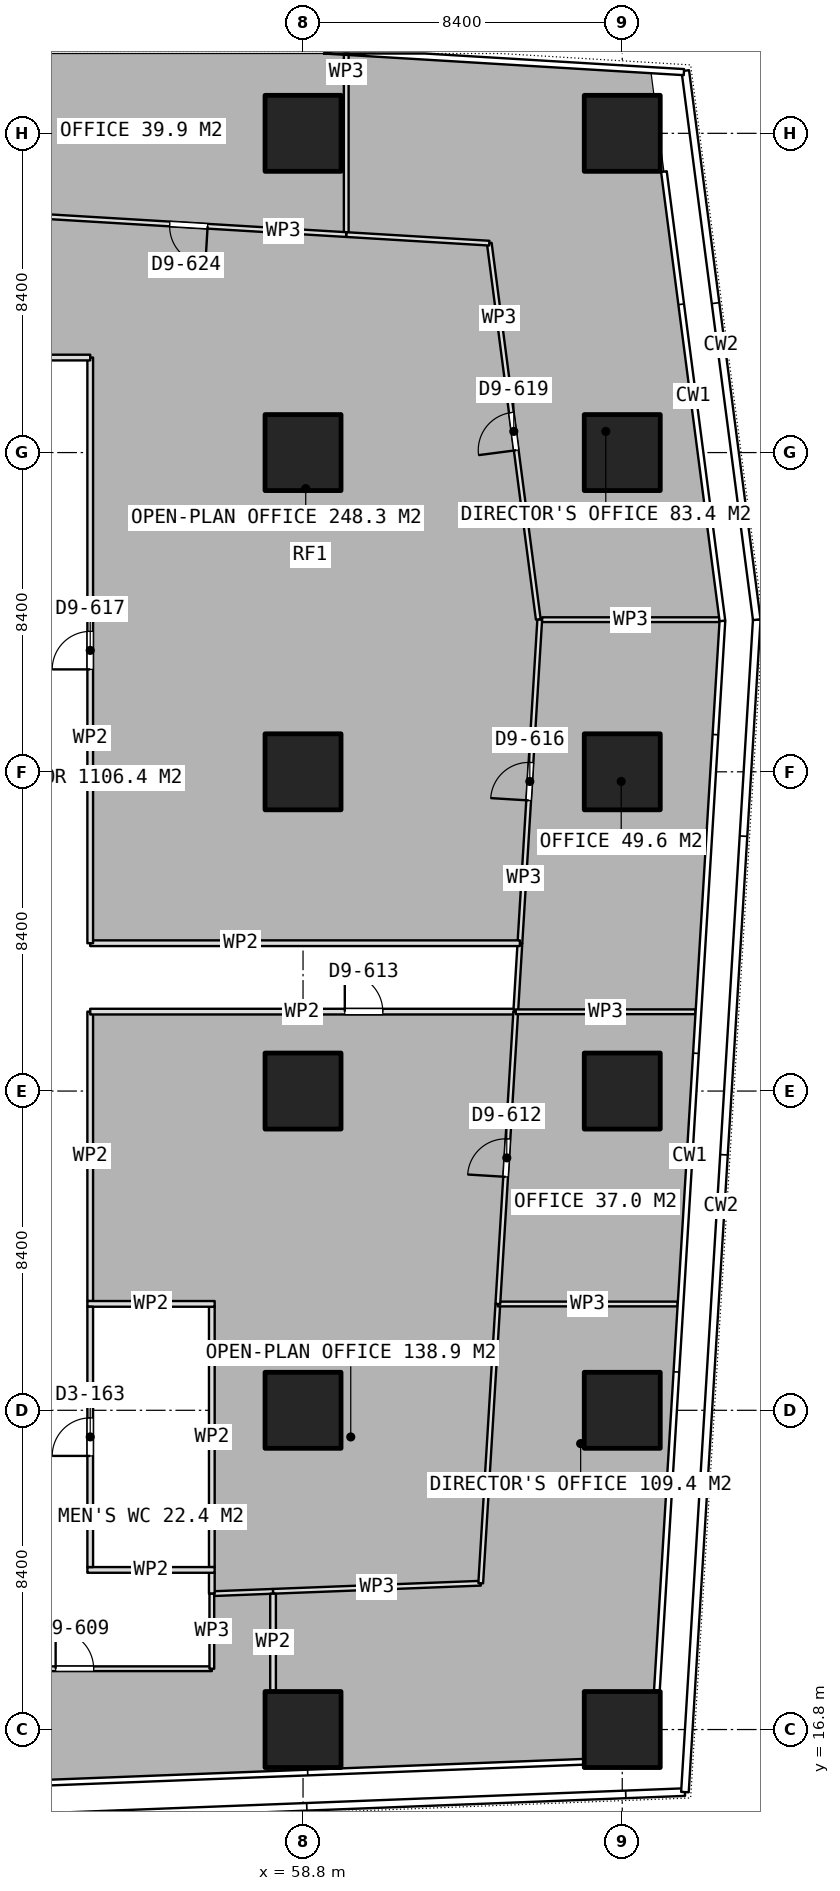
"""IFC4 building model, lengths in metres.
Left out: names, types, materials, properties, quantities, classifications, styles, units other than length and angle.
Written with IfcOpenShell. Run it as: python <this file> out.ifc"""

import sys

from ifc_helpers import new_model, si_unit, direction, frame, frame_2d, origin, origin_2d, place, context, subcontext, project, spatial, rectangle, extrude, element, fill, save


model = new_model("IFC4")
c1 = context("Model", 3, precision=1e-05, world=origin(), true_north=direction((0.0, 1.0)))
c2 = subcontext(c1, "Body", "Model", "MODEL_VIEW")
j1 = project(units=[si_unit("LENGTHUNIT", "METRE"), si_unit("PLANEANGLEUNIT", "RADIAN")], contexts=[c1])
p1 = place(None, origin())
s1 = spatial("IfcSite", under=j1, at=p1, CompositionType="ELEMENT")
p2 = place(p1, origin())
s2 = spatial("IfcBuilding", under=s1, at=p2, CompositionType="ELEMENT")
p3 = place(p2, frame((0.0, 0.0, 151.55)))
s3 = spatial("IfcBuildingStorey", under=s2, at=p3, CompositionType="ELEMENT", Elevation=151.55)
for number, where, z_axis, x_axis in (
    (1, (58.8, 16.8, 0.0), (0.0, 0.0, 1.0), (1.0, 0.0, 0.0)),
    (2, (58.8, 25.2, 0.0), (0.0, 0.0, 1.0), (1.0, 0.0, 0.0)),
    (3, (58.8, 33.6, 0.0), (0.0, 0.0, 1.0), (1.0, 0.0, 0.0)),
    (4, (58.8, 42.0, 0.0), (0.0, 0.0, 1.0), (1.0, 0.0, 0.0)),
    (5, (58.8, 50.4, 0.0), (0.0, 0.0, 1.0), (1.0, 0.0, 0.0)),
    (6, (58.8, 58.8, 0.0), (0.0, 0.0, 1.0), (1.0, 0.0, 0.0)),
    (7, (67.2, 16.8, 0.0), (0.0, 0.0, 1.0), (1.0, 0.0, 0.0)),
    (8, (67.2, 25.2, 0.0), (0.0, 0.0, 1.0), (1.0, 0.0, 0.0)),
    (9, (67.2, 33.6, 0.0), (0.0, 0.0, 1.0), (1.0, 0.0, 0.0)),
    (10, (67.2, 42.0, 0.0), (0.0, 0.0, 1.0), (1.0, 0.0, 0.0)),
    (11, (67.2, 50.4, 0.0), (0.0, 0.0, 1.0), (1.0, 0.0, 0.0)),
    (12, (67.2, 58.8, 0.0), (0.0, 0.0, 1.0), (1.0, 0.0, 0.0)),
):
    element("IfcColumn", number, at=place(p3, frame(where, z_axis=z_axis, x_axis=x_axis)), inside=s3, PredefinedType="COLUMN", context=c2, shape_type="SweptSolid", body=[
        extrude(rectangle(XDim=2.0, YDim=2.0, at=origin_2d()), origin(), (0.0, 0.0, 1.0), 3.75),
    ])
for number, where, z_axis, x_axis in (
    (13, (53.125, 21.0, 0.0), (0.0, 0.0, 1.0), (1.0, 0.0, 0.0)),
    (14, (53.125, 28.0, 0.0), (0.0, 0.0, 1.0), (1.0, 0.0, 0.0)),
):
    element("IfcWall", number, at=place(p3, frame(where, z_axis=z_axis, x_axis=x_axis)), inside=s3, PredefinedType="PARTITIONING", context=c2, shape_type="SweptSolid", body=[
        extrude(rectangle(XDim=3.35, YDim=0.15, at=frame_2d((1.675, 0.0))), origin(), (0.0, 0.0, 1.0), 3.5),
    ])
p4 = place(p3, frame((53.2, 21.075, 0.0), z_axis=(0.0, 0.0, 1.0), x_axis=(0.0, 1.0, 0.0)))
e15 = element("IfcWall", 15, at=p4, inside=s3, PredefinedType="PARTITIONING", context=c2, shape_type="SweptSolid", body=[
    extrude(rectangle(XDim=6.85, YDim=0.15, at=frame_2d((3.425, 0.0))), origin(), (0.0, 0.0, 1.0), 3.5),
])
p5 = place(p4, frame((2.925, 0.0, 0.0)))
e16 = element("IfcOpeningElement", 16, at=p5, cuts=e15, PredefinedType="OPENING", context=c2, shape_type="SweptSolid", body=[
    extrude(rectangle(XDim=1.0, YDim=2.1, at=frame_2d((0.5, 1.05))), frame((0.0, 0.085, 0.0), z_axis=(0.0, -1.0, 0.0), x_axis=(1.0, 0.0, 0.0)), (0.0, 0.0, 1.0), 0.17),
])
p6 = place(p3, frame((56.4, 21.075, 0.0), z_axis=(0.0, 0.0, 1.0), x_axis=(0.0, 1.0, 0.0)))
e17 = element("IfcWall", 17, at=p6, inside=s3, PredefinedType="PARTITIONING", context=c2, shape_type="SweptSolid", body=[
    extrude(rectangle(XDim=6.85, YDim=0.15, at=frame_2d((3.425, 0.0))), origin(), (0.0, 0.0, 1.0), 3.5),
])
p7 = place(p3, frame((56.4, 20.374, 0.0), z_axis=(0.0, 0.0, 1.0), x_axis=(0.999237517487, 0.039043355976, 0.0)))
e18 = element("IfcWall", 18, at=p7, inside=s3, PredefinedType="PARTITIONING", context=c2, shape_type="SweptSolid", body=[
    extrude(rectangle(XDim=1.613, YDim=0.125, at=frame_2d((0.807, 0.0))), origin(), (0.0, 0.0, 1.0), 3.5),
])
p8 = place(p3, frame((58.012, 20.437, 0.0), z_axis=(0.0, 0.0, 1.0), x_axis=(0.999241859152, 0.038932080836, 0.0)))
e19 = element("IfcWall", 19, at=p8, inside=s3, PredefinedType="PARTITIONING", context=c2, shape_type="SweptSolid", body=[
    extrude(rectangle(XDim=5.468, YDim=0.125, at=frame_2d((2.734, 0.0))), origin(), (0.0, 0.0, 1.0), 3.5),
])
p9 = place(p3, frame((63.476, 20.65, 0.0), z_axis=(0.0, 0.0, 1.0), x_axis=(0.061126922055, 0.998130001252, 0.0)))
e20 = element("IfcWall", 20, at=p9, inside=s3, PredefinedType="PARTITIONING", context=c2, shape_type="SweptSolid", body=[
    extrude(rectangle(XDim=7.361, YDim=0.125, at=frame_2d((3.68, 0.0))), origin(), (0.0, 0.0, 1.0), 3.5),
])
p10 = place(p3, frame((63.926, 27.997, 0.0), z_axis=(0.0, 0.0, 1.0), x_axis=(1.0, 0.0, 0.0)))
e21 = element("IfcWall", 21, at=p10, inside=s3, PredefinedType="PARTITIONING", context=c2, shape_type="SweptSolid", body=[
    extrude(rectangle(XDim=4.729, YDim=0.125, at=frame_2d((2.365, 0.0))), origin(), (0.0, 0.0, 1.0), 3.5),
])
p11 = place(p3, frame((49.18, 18.4, 0.0), z_axis=(0.0, 0.0, 1.0), x_axis=(1.0, 0.0, 0.0)))
e22 = element("IfcWall", 22, at=p11, inside=s3, PredefinedType="PARTITIONING", context=c2, shape_type="SweptSolid", body=[
    extrude(rectangle(XDim=7.22, YDim=0.125, at=frame_2d((3.61, 0.0))), origin(), (0.0, 0.0, 1.0), 3.5),
])
p12 = place(p11, frame((3.11, 0.0, 0.0)))
e23 = element("IfcOpeningElement", 23, at=p12, cuts=e22, PredefinedType="OPENING", context=c2, shape_type="SweptSolid", body=[
    extrude(rectangle(XDim=1.0, YDim=2.1, at=frame_2d((0.5, 1.05))), frame((0.0, 0.073, 0.0), z_axis=(0.0, -1.0, 0.0), x_axis=(1.0, 0.0, 0.0)), (0.0, 0.0, 1.0), 0.145),
])
p13 = place(p3, frame((56.4, 18.4, 0.0), z_axis=(0.0, 0.0, 1.0), x_axis=(0.0, 1.0, 0.0)))
e24 = element("IfcWall", 24, at=p13, inside=s3, PredefinedType="PARTITIONING", context=c2, shape_type="SweptSolid", body=[
    extrude(rectangle(XDim=1.974, YDim=0.125, at=frame_2d((0.987, 0.0))), origin(), (0.0, 0.0, 1.0), 3.5),
])
p14 = place(p3, frame((63.926, 27.998, 0.0), z_axis=(0.0, 0.0, 1.0), x_axis=(0.061142930486, 0.998129020744, 0.0)))
e25 = element("IfcWall", 25, at=p14, inside=s3, PredefinedType="PARTITIONING", context=c2, shape_type="SweptSolid", body=[
    extrude(rectangle(XDim=7.702, YDim=0.125, at=frame_2d((3.851, 0.0))), origin(), (0.0, 0.0, 1.0), 3.5),
])
p15 = place(p14, frame((3.351, 0.0, 0.0)))
e26 = element("IfcOpeningElement", 26, at=p15, cuts=e25, PredefinedType="OPENING", context=c2, shape_type="SweptSolid", body=[
    extrude(rectangle(XDim=1.0, YDim=2.1, at=frame_2d((0.5, 1.05))), frame((0.0, 0.073, 0.0), z_axis=(0.0, -1.0, 0.0), x_axis=(1.0, 0.0, 0.0)), (0.0, 0.0, 1.0), 0.145),
])
p16 = place(p3, frame((64.397, 35.686, 0.0), z_axis=(0.0, 0.0, 1.0), x_axis=(1.0, 0.0, 0.0)))
e27 = element("IfcWall", 27, at=p16, inside=s3, PredefinedType="PARTITIONING", context=c2, shape_type="SweptSolid", body=[
    extrude(rectangle(XDim=4.729, YDim=0.125, at=frame_2d((2.365, 0.0))), origin(), (0.0, 0.0, 1.0), 3.5),
])
p17 = place(p3, frame((64.507, 37.49, 0.0), z_axis=(0.0, 0.0, 1.0), x_axis=(0.061156590163, 0.998128183892, 0.0)))
e28 = element("IfcWall", 28, at=p17, inside=s3, PredefinedType="PARTITIONING", context=c2, shape_type="SweptSolid", body=[
    extrude(rectangle(XDim=8.535, YDim=0.125, at=frame_2d((4.268, 0.0))), origin(), (0.0, 0.0, 1.0), 3.5),
])
p18 = place(p17, frame((3.764, 0.0, 0.0)))
e29 = element("IfcOpeningElement", 29, at=p18, cuts=e28, PredefinedType="OPENING", context=c2, shape_type="SweptSolid", body=[
    extrude(rectangle(XDim=1.0, YDim=2.1, at=frame_2d((0.5, 1.05))), frame((0.0, 0.073, 0.0), z_axis=(0.0, -1.0, 0.0), x_axis=(1.0, 0.0, 0.0)), (0.0, 0.0, 1.0), 0.145),
])
p19 = place(p3, frame((65.091, 46.003, 0.0), z_axis=(0.0, 0.0, 1.0), x_axis=(1.0, 0.0, 0.0)))
e30 = element("IfcWall", 30, at=p19, inside=s3, PredefinedType="PARTITIONING", context=c2, shape_type="SweptSolid", body=[
    extrude(rectangle(XDim=4.66, YDim=0.125, at=frame_2d((2.33, 0.0))), origin(), (0.0, 0.0, 1.0), 3.5),
])
p20 = place(p3, frame((64.397, 35.687, 0.0), z_axis=(0.0, 0.0, 1.0), x_axis=(0.060956173326, 0.998140443492, 0.0)))
e31 = element("IfcWall", 31, at=p20, inside=s3, PredefinedType="PARTITIONING", context=c2, shape_type="SweptSolid", body=[
    extrude(rectangle(XDim=1.806, YDim=0.125, at=frame_2d((0.903, 0.0))), origin(), (0.0, 0.0, 1.0), 3.5),
])
p21 = place(p3, frame((59.937, 56.136, 0.0), z_axis=(0.0, 0.0, 1.0), x_axis=(0.0, 1.0, 0.0)))
e32 = element("IfcWall", 32, at=p21, inside=s3, PredefinedType="PARTITIONING", context=c2, shape_type="SweptSolid", body=[
    extrude(rectangle(XDim=4.758, YDim=0.125, at=frame_2d((2.379, 0.0))), origin(), (0.0, 0.0, 1.0), 3.5),
])
p22 = place(p3, frame((64.99, 46.011, 0.0), z_axis=(0.0, 0.0, 1.0), x_axis=(-0.129132161752, 0.991627392119, 0.0)))
e33 = element("IfcWall", 33, at=p22, inside=s3, PredefinedType="PARTITIONING", context=c2, shape_type="SweptSolid", body=[
    extrude(rectangle(XDim=9.982, YDim=0.125, at=frame_2d((4.991, 0.0))), origin(), (0.0, 0.0, 1.0), 3.5),
])
p23 = place(p22, frame((4.488, 0.0, 0.0)))
e34 = element("IfcOpeningElement", 34, at=p23, cuts=e33, PredefinedType="OPENING", context=c2, shape_type="SweptSolid", body=[
    extrude(rectangle(XDim=1.0, YDim=2.1, at=frame_2d((0.5, 1.05))), frame((0.0, 0.073, 0.0), z_axis=(0.0, -1.0, 0.0), x_axis=(1.0, 0.0, 0.0)), (0.0, 0.0, 1.0), 0.145),
])
p24 = place(p3, frame((63.701, 55.91, 0.0), z_axis=(0.0, 0.0, 1.0), x_axis=(-0.99820105001, 0.059955514841, 0.0)))
e35 = element("IfcWall", 35, at=p24, inside=s3, PredefinedType="PARTITIONING", context=c2, shape_type="SweptSolid", body=[
    extrude(rectangle(XDim=3.771, YDim=0.125, at=frame_2d((1.885, 0.0))), origin(), (0.0, 0.0, 1.0), 3.5),
])
p25 = place(p3, frame((59.936, 56.136, 0.0), z_axis=(0.0, 0.0, 1.0), x_axis=(-0.998201048184, 0.059955545233, 0.0)))
e36 = element("IfcWall", 36, at=p25, inside=s3, PredefinedType="PARTITIONING", context=c2, shape_type="SweptSolid", body=[
    extrude(rectangle(XDim=8.307, YDim=0.125, at=frame_2d((4.153, 0.0))), origin(), (0.0, 0.0, 1.0), 3.5),
])
p26 = place(p25, frame((3.653, 0.0, 0.0)))
e37 = element("IfcOpeningElement", 37, at=p26, cuts=e36, PredefinedType="OPENING", context=c2, shape_type="SweptSolid", body=[
    extrude(rectangle(XDim=1.0, YDim=2.1, at=frame_2d((0.5, 1.05))), frame((0.0, 0.073, 0.0), z_axis=(0.0, -1.0, 0.0), x_axis=(1.0, 0.0, 0.0)), (0.0, 0.0, 1.0), 0.145),
])
p27 = place(p3, frame((64.507, 37.49, 0.0), z_axis=(0.0, 0.0, 1.0), x_axis=(-1.0, 0.0, 0.0)))
e38 = element("IfcWall", 38, at=p27, inside=s3, PredefinedType="PARTITIONING", context=c2, shape_type="SweptSolid", body=[
    extrude(rectangle(XDim=11.307, YDim=0.15, at=frame_2d((5.654, 0.0))), origin(), (0.0, 0.0, 1.0), 3.5),
])
p28 = place(p3, frame((53.2, 37.49, 0.0), z_axis=(0.0, 0.0, 1.0), x_axis=(0.0, 1.0, 0.0)))
e39 = element("IfcWall", 39, at=p28, inside=s3, PredefinedType="PARTITIONING", context=c2, shape_type="SweptSolid", body=[
    extrude(rectangle(XDim=15.41, YDim=0.15, at=frame_2d((7.705, 0.0))), origin(), (0.0, 0.0, 1.0), 3.5),
])
p29 = place(p28, frame((7.205, 0.0, 0.0)))
e40 = element("IfcOpeningElement", 40, at=p29, cuts=e39, PredefinedType="OPENING", context=c2, shape_type="SweptSolid", body=[
    extrude(rectangle(XDim=1.0, YDim=2.1, at=frame_2d((0.5, 1.05))), frame((0.0, 0.085, 0.0), z_axis=(0.0, -1.0, 0.0), x_axis=(1.0, 0.0, 0.0)), (0.0, 0.0, 1.0), 0.17),
])
p30 = place(p3, frame((53.2, 52.9, 0.0), z_axis=(0.0, 0.0, 1.0), x_axis=(-1.0, 0.0, 0.0)))
e41 = element("IfcWall", 41, at=p30, inside=s3, PredefinedType="PARTITIONING", context=c2, shape_type="SweptSolid", body=[
    extrude(rectangle(XDim=9.197, YDim=0.15, at=frame_2d((4.599, 0.0))), origin(), (0.0, 0.0, 1.0), 3.5),
])
p31 = place(p3, frame((58.011, 20.374, 0.0), z_axis=(0.0, 0.0, 1.0), x_axis=(0.0, -1.0, 0.0)))
e42 = element("IfcWall", 42, at=p31, inside=s3, PredefinedType="PARTITIONING", context=c2, shape_type="SweptSolid", body=[
    extrude(rectangle(XDim=2.554, YDim=0.15, at=frame_2d((1.277, 0.0))), origin(), (0.0, 0.0, 1.0), 3.5),
])
p32 = place(p3, frame((56.4, 20.374, 0.0), z_axis=(0.0, 0.0, 1.0), x_axis=(0.0, 1.0, 0.0)))
e43 = element("IfcWall", 43, at=p32, inside=s3, PredefinedType="PARTITIONING", context=c2, shape_type="SweptSolid", body=[
    extrude(rectangle(XDim=0.551, YDim=0.15, at=frame_2d((0.275, 0.0))), origin(), (0.0, 0.0, 1.0), 3.5),
])
p33 = place(p3, frame((53.2, 28.075, 0.0), z_axis=(0.0, 0.0, 1.0), x_axis=(0.0, 1.0, 0.0)))
e44 = element("IfcWall", 44, at=p33, inside=s3, PredefinedType="PARTITIONING", context=c2, shape_type="SweptSolid", body=[
    extrude(rectangle(XDim=7.615, YDim=0.15, at=frame_2d((3.808, 0.0))), origin(), (0.0, 0.0, 1.0), 3.5),
])
p34 = place(p3, frame((53.2, 35.69, 0.0), z_axis=(0.0, 0.0, 1.0), x_axis=(1.0, 0.0, 0.0)))
e45 = element("IfcWall", 45, at=p34, inside=s3, PredefinedType="PARTITIONING", context=c2, shape_type="SweptSolid", body=[
    extrude(rectangle(XDim=11.148, YDim=0.15, at=frame_2d((5.574, 0.0))), origin(), (0.0, 0.0, 1.0), 3.5),
])
p35 = place(p34, frame((6.699, 0.0, 0.0)))
e46 = element("IfcOpeningElement", 46, at=p35, cuts=e45, PredefinedType="OPENING", context=c2, shape_type="SweptSolid", body=[
    extrude(rectangle(XDim=1.0, YDim=2.1, at=frame_2d((0.5, 1.05))), frame((0.0, 0.085, 0.0), z_axis=(0.0, -1.0, 0.0), x_axis=(1.0, 0.0, 0.0)), (0.0, 0.0, 1.0), 0.17),
])
p36 = place(p5, origin())
e47 = element("IfcDoor", 47, at=p36, inside=s3, OperationType="SINGLE_SWING_LEFT", PredefinedType="DOOR", context=c2, shape_type="SweptSolid", body=[
    extrude(rectangle(XDim=1.0, YDim=2.1, at=frame_2d((0.5, 1.05))), frame((0.0, 0.025, 0.0), z_axis=(0.0, -1.0, 0.0), x_axis=(1.0, 0.0, 0.0)), (0.0, 0.0, 1.0), 0.05),
])
fill(e16, e47)
p37 = place(p12, origin())
e48 = element("IfcDoor", 48, at=p37, inside=s3, OperationType="SINGLE_SWING_LEFT", PredefinedType="DOOR", context=c2, shape_type="SweptSolid", body=[
    extrude(rectangle(XDim=1.0, YDim=2.1, at=frame_2d((0.5, 1.05))), frame((0.0, 0.025, 0.0), z_axis=(0.0, -1.0, 0.0), x_axis=(1.0, 0.0, 0.0)), (0.0, 0.0, 1.0), 0.05),
])
fill(e23, e48)
p38 = place(p15, origin())
e49 = element("IfcDoor", 49, at=p38, inside=s3, OperationType="SINGLE_SWING_LEFT", PredefinedType="DOOR", context=c2, shape_type="SweptSolid", body=[
    extrude(rectangle(XDim=1.0, YDim=2.1, at=frame_2d((0.5, 1.05))), frame((0.0, 0.025, 0.0), z_axis=(0.0, -1.0, 0.0), x_axis=(1.0, 0.0, 0.0)), (0.0, 0.0, 1.0), 0.05),
])
fill(e26, e49)
p39 = place(p18, origin())
e50 = element("IfcDoor", 50, at=p39, inside=s3, OperationType="SINGLE_SWING_LEFT", PredefinedType="DOOR", context=c2, shape_type="SweptSolid", body=[
    extrude(rectangle(XDim=1.0, YDim=2.1, at=frame_2d((0.5, 1.05))), frame((0.0, 0.025, 0.0), z_axis=(0.0, -1.0, 0.0), x_axis=(1.0, 0.0, 0.0)), (0.0, 0.0, 1.0), 0.05),
])
fill(e29, e50)
p40 = place(p23, origin())
e51 = element("IfcDoor", 51, at=p40, inside=s3, OperationType="SINGLE_SWING_LEFT", PredefinedType="DOOR", context=c2, shape_type="SweptSolid", body=[
    extrude(rectangle(XDim=1.0, YDim=2.1, at=frame_2d((0.5, 1.05))), frame((0.0, 0.025, 0.0), z_axis=(0.0, -1.0, 0.0), x_axis=(1.0, 0.0, 0.0)), (0.0, 0.0, 1.0), 0.05),
])
fill(e34, e51)
p41 = place(p26, origin())
e52 = element("IfcDoor", 52, at=p41, inside=s3, OperationType="SINGLE_SWING_LEFT", PredefinedType="DOOR", context=c2, shape_type="SweptSolid", body=[
    extrude(rectangle(XDim=1.0, YDim=2.1, at=frame_2d((0.5, 1.05))), frame((0.0, 0.025, 0.0), z_axis=(0.0, -1.0, 0.0), x_axis=(1.0, 0.0, 0.0)), (0.0, 0.0, 1.0), 0.05),
])
fill(e37, e52)
p42 = place(p29, origin())
e53 = element("IfcDoor", 53, at=p42, inside=s3, OperationType="SINGLE_SWING_LEFT", PredefinedType="DOOR", context=c2, shape_type="SweptSolid", body=[
    extrude(rectangle(XDim=1.0, YDim=2.1, at=frame_2d((0.5, 1.05))), frame((0.0, 0.025, 0.0), z_axis=(0.0, -1.0, 0.0), x_axis=(1.0, 0.0, 0.0)), (0.0, 0.0, 1.0), 0.05),
])
fill(e40, e53)
p43 = place(p35, origin())
e54 = element("IfcDoor", 54, at=p43, inside=s3, OperationType="SINGLE_SWING_LEFT", PredefinedType="DOOR", context=c2, shape_type="SweptSolid", body=[
    extrude(rectangle(XDim=1.0, YDim=2.1, at=frame_2d((0.5, 1.05))), frame((0.0, 0.025, 0.0), z_axis=(0.0, -1.0, 0.0), x_axis=(1.0, 0.0, 0.0)), (0.0, 0.0, 1.0), 0.05),
])
fill(e46, e54)
save(model, sys.argv[1])
